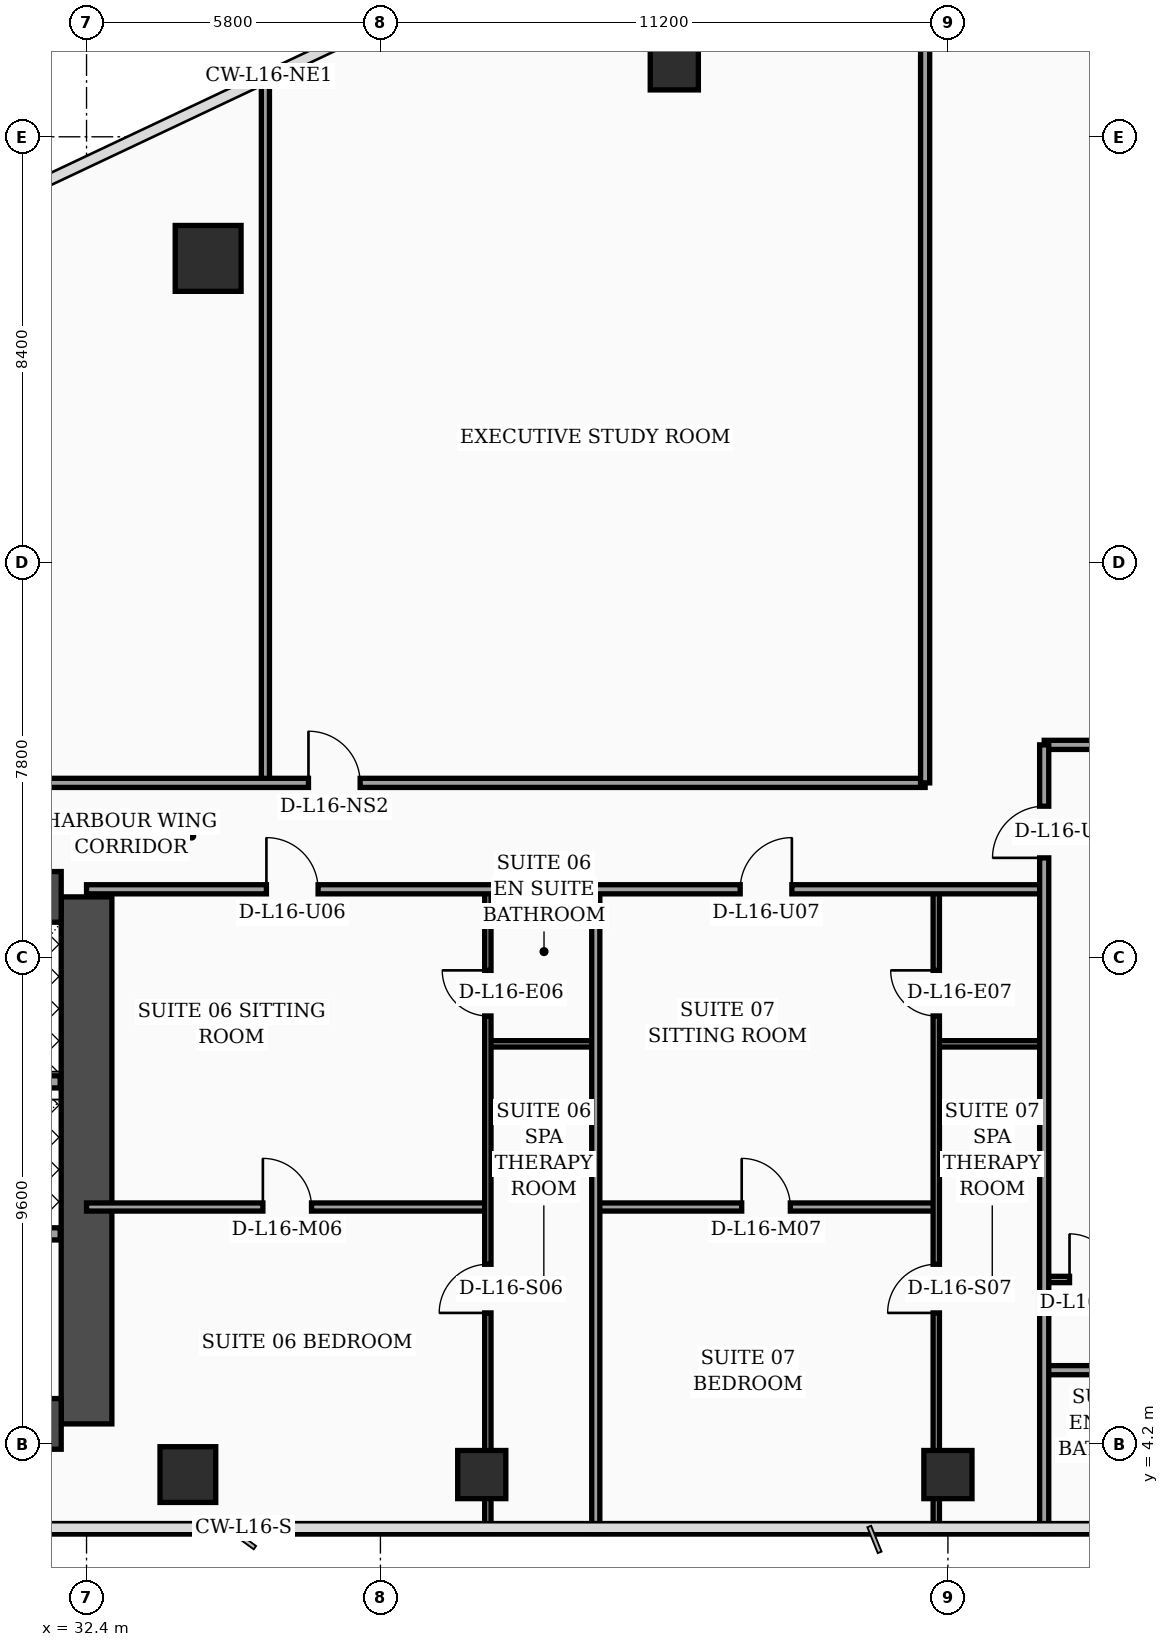
"""IFC4 building model, lengths in metres.
Left out: names, types, materials, properties, quantities, classifications, styles, units other than length and angle.
Written with IfcOpenShell. Run it as: python <this file> out.ifc"""

import sys

from ifc_helpers import new_model, si_unit, direction, frame, frame_2d, origin, origin_2d, place, context, subcontext, project, spatial, rectangle, hollow_rectangle, circle, extrude, element, fill, save


model = new_model("IFC4")
c1 = context("Model", 3, precision=1e-05, world=origin(), true_north=direction((0.0, 1.0)))
c2 = subcontext(c1, "Body", "Model", "MODEL_VIEW")
j1 = project(units=[si_unit("LENGTHUNIT", "METRE"), si_unit("PLANEANGLEUNIT", "RADIAN")], contexts=[c1])
p1 = place(None, origin())
s1 = spatial("IfcSite", under=j1, at=p1, CompositionType="ELEMENT")
p2 = place(p1, origin())
s2 = spatial("IfcBuilding", under=s1, at=p2, CompositionType="ELEMENT")
p3 = place(p2, frame((0.0, 0.0, 69.8)))
s3 = spatial("IfcBuildingStorey", under=s2, at=p3, CompositionType="ELEMENT", Elevation=69.8)
p4 = place(p3, frame((32.4, 4.6, 0.0), z_axis=(0.0, 0.0, 1.0), x_axis=(0.0, 1.0, 0.0)))
e1 = element("IfcWall", 1, at=p4, inside=s3, PredefinedType="SHEAR", context=c2, shape_type="SweptSolid", body=[
    extrude(rectangle(XDim=10.4, YDim=1.0, at=frame_2d((5.2, 0.0))), origin(), (0.0, 0.0, 1.0), 3.56),
])
p5 = place(p3, frame((22.1, 15.0, 0.0), z_axis=(0.0, 0.0, 1.0), x_axis=(1.0, 0.0, 0.0)))
e2 = element("IfcWall", 2, at=p5, inside=s3, PredefinedType="SHEAR", context=c2, shape_type="SweptSolid", body=[
    extrude(rectangle(XDim=9.8, YDim=1.0, at=frame_2d((4.9, 0.0))), origin(), (0.0, 0.0, 1.0), 3.56),
])
p6 = place(p5, frame((4.8, 0.0, 0.0)))
e3 = element("IfcOpeningElement", 3, at=p6, cuts=e2, PredefinedType="OPENING", context=c2, shape_type="SweptSolid", body=[
    extrude(rectangle(XDim=1.1, YDim=2.2, at=frame_2d((0.55, 1.1))), frame((0.0, 0.51, 0.0), z_axis=(0.0, -1.0, 0.0), x_axis=(1.0, 0.0, 0.0)), (0.0, 0.0, 1.0), 1.02),
])
p7 = place(p3, frame((22.1, 4.6, 0.0), z_axis=(0.0, 0.0, 1.0), x_axis=(1.0, 0.0, 0.0)))
e4 = element("IfcWall", 4, at=p7, inside=s3, PredefinedType="SHEAR", context=c2, shape_type="SweptSolid", body=[
    extrude(rectangle(XDim=9.8, YDim=1.0, at=frame_2d((4.9, 0.0))), origin(), (0.0, 0.0, 1.0), 3.56),
])
p8 = place(p3, frame((34.4, 3.6, 0.0), z_axis=(0.0, 0.0, 1.0), x_axis=(1.0, 0.0, 0.0)))
e5 = element("IfcColumn", 5, at=p8, inside=s3, PredefinedType="COLUMN", context=c2, shape_type="SweptSolid", body=[
    extrude(hollow_rectangle(XDim=1.1, YDim=1.1, WallThickness=0.045, at=origin_2d()), origin(), (0.0, 0.0, 1.0), 3.56),
])
for number, where, z_axis, x_axis in (
    (6, (40.2, 3.6, 0.0), (0.0, 0.0, 1.0), (1.0, 0.0, 0.0)),
    (7, (49.4, 3.6, 0.0), (0.0, 0.0, 1.0), (1.0, 0.0, 0.0)),
):
    element("IfcColumn", number, at=place(p3, frame(where, z_axis=z_axis, x_axis=x_axis)), inside=s3, PredefinedType="COLUMN", context=c2, shape_type="SweptSolid", body=[
        extrude(hollow_rectangle(XDim=0.95, YDim=0.95, WallThickness=0.04, at=origin_2d()), origin(), (0.0, 0.0, 1.0), 3.56),
    ])
p9 = place(p3, frame((34.8, 27.6, 0.0), z_axis=(0.0, 0.0, 1.0), x_axis=(1.0, 0.0, 0.0)))
e8 = element("IfcColumn", 8, at=p9, inside=s3, PredefinedType="COLUMN", context=c2, shape_type="SweptSolid", body=[
    extrude(circle(Radius=0.65, at=origin_2d()), origin(), (0.0, 0.0, 1.0), 3.56),
])
p10 = place(p3, frame((44.0, 31.4, 0.0), z_axis=(0.0, 0.0, 1.0), x_axis=(1.0, 0.0, 0.0)))
e9 = element("IfcColumn", 9, at=p10, inside=s3, PredefinedType="COLUMN", context=c2, shape_type="SweptSolid", body=[
    extrude(hollow_rectangle(XDim=0.95, YDim=0.95, WallThickness=0.04, at=origin_2d()), origin(), (0.0, 0.0, 1.0), 3.56),
])
p11 = place(p3, frame((27.02, 11.35, 0.0), z_axis=(0.0, 0.0, 1.0), x_axis=(1.0, 0.0, 0.0)))
e10 = element("IfcWall", 10, at=p11, inside=s3, PredefinedType="SOLIDWALL", context=c2, shape_type="SweptSolid", body=[
    extrude(rectangle(XDim=4.86, YDim=0.24, at=frame_2d((2.43, 0.0))), origin(), (0.0, 0.0, 1.0), 3.56),
])
p12 = place(p11, frame((0.45, 0.0, 0.0)))
e11 = element("IfcOpeningElement", 11, at=p12, cuts=e10, PredefinedType="OPENING", context=c2, shape_type="SweptSolid", body=[
    extrude(rectangle(XDim=1.3, YDim=2.35, at=frame_2d((0.65, 1.175))), frame((0.0, 0.13, 0.0), z_axis=(0.0, -1.0, 0.0), x_axis=(1.0, 0.0, 0.0)), (0.0, 0.0, 1.0), 0.26),
])
p13 = place(p3, frame((27.02, 8.35, 0.0), z_axis=(0.0, 0.0, 1.0), x_axis=(1.0, 0.0, 0.0)))
e12 = element("IfcWall", 12, at=p13, inside=s3, PredefinedType="SOLIDWALL", context=c2, shape_type="SweptSolid", body=[
    extrude(rectangle(XDim=4.86, YDim=0.24, at=frame_2d((2.43, 0.0))), origin(), (0.0, 0.0, 1.0), 3.09),
])
p14 = place(p3, frame((40.32, 12.1, 0.0), z_axis=(0.0, 0.0, 1.0), x_axis=(1.0, 0.0, 0.0)))
e13 = element("IfcWall", 13, at=p14, inside=s3, PredefinedType="PARTITIONING", context=c2, shape_type="SweptSolid", body=[
    extrude(rectangle(XDim=2.13, YDim=0.125, at=frame_2d((1.065, 0.0))), origin(), (0.0, 0.0, 1.0), 3.56),
])
p15 = place(p3, frame((32.4, 8.88, 0.0), z_axis=(0.0, 0.0, 1.0), x_axis=(1.0, 0.0, 0.0)))
e14 = element("IfcWall", 14, at=p15, inside=s3, PredefinedType="PARTITIONING", context=c2, shape_type="SweptSolid", body=[
    extrude(rectangle(XDim=7.92, YDim=0.16, at=frame_2d((3.96, 0.0))), origin(), (0.0, 0.0, 1.0), 2.84),
])
p16 = place(p15, frame((3.48, 0.0, 0.0)))
e15 = element("IfcOpeningElement", 15, at=p16, cuts=e14, PredefinedType="OPENING", context=c2, shape_type="SweptSolid", body=[
    extrude(rectangle(XDim=0.96, YDim=2.2, at=frame_2d((0.48, 1.1))), frame((0.0, 0.09, 0.0), z_axis=(0.0, -1.0, 0.0), x_axis=(1.0, 0.0, 0.0)), (0.0, 0.0, 1.0), 0.18),
])
p17 = place(p3, frame((40.32, 2.44, 0.0), z_axis=(0.0, 0.0, 1.0), x_axis=(0.0, 1.0, 0.0)))
e16 = element("IfcWall", 16, at=p17, inside=s3, PredefinedType="PARTITIONING", context=c2, shape_type="SweptSolid", body=[
    extrude(rectangle(XDim=12.71, YDim=0.125, at=frame_2d((6.355, 0.0))), origin(), (0.0, 0.0, 1.0), 2.84),
])
p18 = place(p17, frame((4.35, 0.0, 0.0)))
e17 = element("IfcOpeningElement", 17, at=p18, cuts=e16, PredefinedType="OPENING", context=c2, shape_type="SweptSolid", body=[
    extrude(rectangle(XDim=0.96, YDim=2.2, at=frame_2d((0.48, 1.1))), frame((0.0, 0.073, 0.0), z_axis=(0.0, -1.0, 0.0), x_axis=(1.0, 0.0, 0.0)), (0.0, 0.0, 1.0), 0.145),
])
p19 = place(p17, frame((10.21, 0.0, 0.0)))
e18 = element("IfcOpeningElement", 18, at=p19, cuts=e16, PredefinedType="OPENING", context=c2, shape_type="SweptSolid", body=[
    extrude(rectangle(XDim=0.9, YDim=2.15, at=frame_2d((0.45, 1.075))), frame((0.0, 0.073, 0.0), z_axis=(0.0, -1.0, 0.0), x_axis=(1.0, 0.0, 0.0)), (0.0, 0.0, 1.0), 0.145),
])
p20 = place(p3, frame((49.17, 12.1, 0.0), z_axis=(0.0, 0.0, 1.0), x_axis=(1.0, 0.0, 0.0)))
e19 = element("IfcWall", 19, at=p20, inside=s3, PredefinedType="PARTITIONING", context=c2, shape_type="SweptSolid", body=[
    extrude(rectangle(XDim=2.13, YDim=0.125, at=frame_2d((1.065, 0.0))), origin(), (0.0, 0.0, 1.0), 3.56),
])
p21 = place(p3, frame((42.45, 8.88, 0.0), z_axis=(0.0, 0.0, 1.0), x_axis=(1.0, 0.0, 0.0)))
e20 = element("IfcWall", 20, at=p21, inside=s3, PredefinedType="PARTITIONING", context=c2, shape_type="SweptSolid", body=[
    extrude(rectangle(XDim=6.72, YDim=0.16, at=frame_2d((3.36, 0.0))), origin(), (0.0, 0.0, 1.0), 2.84),
])
p22 = place(p21, frame((2.88, 0.0, 0.0)))
e21 = element("IfcOpeningElement", 21, at=p22, cuts=e20, PredefinedType="OPENING", context=c2, shape_type="SweptSolid", body=[
    extrude(rectangle(XDim=0.96, YDim=2.2, at=frame_2d((0.48, 1.1))), frame((0.0, 0.09, 0.0), z_axis=(0.0, -1.0, 0.0), x_axis=(1.0, 0.0, 0.0)), (0.0, 0.0, 1.0), 0.18),
])
p23 = place(p3, frame((49.17, 2.44, 0.0), z_axis=(0.0, 0.0, 1.0), x_axis=(0.0, 1.0, 0.0)))
e22 = element("IfcWall", 22, at=p23, inside=s3, PredefinedType="PARTITIONING", context=c2, shape_type="SweptSolid", body=[
    extrude(rectangle(XDim=12.71, YDim=0.125, at=frame_2d((6.355, 0.0))), origin(), (0.0, 0.0, 1.0), 2.84),
])
p24 = place(p23, frame((4.35, 0.0, 0.0)))
e23 = element("IfcOpeningElement", 23, at=p24, cuts=e22, PredefinedType="OPENING", context=c2, shape_type="SweptSolid", body=[
    extrude(rectangle(XDim=0.96, YDim=2.2, at=frame_2d((0.48, 1.1))), frame((0.0, 0.073, 0.0), z_axis=(0.0, -1.0, 0.0), x_axis=(1.0, 0.0, 0.0)), (0.0, 0.0, 1.0), 0.145),
])
p25 = place(p23, frame((10.21, 0.0, 0.0)))
e24 = element("IfcOpeningElement", 24, at=p25, cuts=e22, PredefinedType="OPENING", context=c2, shape_type="SweptSolid", body=[
    extrude(rectangle(XDim=0.9, YDim=2.15, at=frame_2d((0.45, 1.075))), frame((0.0, 0.073, 0.0), z_axis=(0.0, -1.0, 0.0), x_axis=(1.0, 0.0, 0.0)), (0.0, 0.0, 1.0), 0.145),
])
p26 = place(p3, frame((42.45, 2.44, 0.0), z_axis=(0.0, 0.0, 1.0), x_axis=(0.0, 1.0, 0.0)))
e25 = element("IfcWall", 25, at=p26, inside=s3, PredefinedType="PARTITIONING", context=c2, shape_type="SweptSolid", body=[
    extrude(rectangle(XDim=12.71, YDim=0.16, at=frame_2d((6.355, 0.0))), origin(), (0.0, 0.0, 1.0), 3.04),
])
p27 = place(p3, frame((32.4, 15.15, 0.0), z_axis=(0.0, 0.0, 1.0), x_axis=(1.0, 0.0, 0.0)))
e26 = element("IfcWall", 26, at=p27, inside=s3, PredefinedType="PARTITIONING", context=c2, shape_type="SweptSolid", body=[
    extrude(rectangle(XDim=18.9, YDim=0.18, at=frame_2d((9.45, 0.0))), origin(), (0.0, 0.0, 1.0), 2.84),
])
p28 = place(p27, frame((3.55, 0.0, 0.0)))
e27 = element("IfcOpeningElement", 27, at=p28, cuts=e26, PredefinedType="OPENING", context=c2, shape_type="SweptSolid", body=[
    extrude(rectangle(XDim=1.02, YDim=2.2, at=frame_2d((0.51, 1.1))), frame((0.0, 0.1, 0.0), z_axis=(0.0, -1.0, 0.0), x_axis=(1.0, 0.0, 0.0)), (0.0, 0.0, 1.0), 0.2),
])
p29 = place(p27, frame((12.9, 0.0, 0.0)))
e28 = element("IfcOpeningElement", 28, at=p29, cuts=e26, PredefinedType="OPENING", context=c2, shape_type="SweptSolid", body=[
    extrude(rectangle(XDim=1.02, YDim=2.2, at=frame_2d((0.51, 1.1))), frame((0.0, 0.1, 0.0), z_axis=(0.0, -1.0, 0.0), x_axis=(1.0, 0.0, 0.0)), (0.0, 0.0, 1.0), 0.2),
])
p30 = place(p3, frame((35.93, 17.25, 0.0), z_axis=(0.0, 0.0, 1.0), x_axis=(0.0, 1.0, 0.0)))
e29 = element("IfcWall", 29, at=p30, inside=s3, PredefinedType="PARTITIONING", context=c2, shape_type="SweptSolid", body=[
    extrude(rectangle(XDim=14.0, YDim=0.16, at=frame_2d((7.0, 0.0))), origin(), (0.0, 0.0, 1.0), 2.84),
])
p31 = place(p3, frame((21.5, 17.25, 0.0), z_axis=(0.0, 0.0, 1.0), x_axis=(1.0, 0.0, 0.0)))
e30 = element("IfcWall", 30, at=p31, inside=s3, PredefinedType="PARTITIONING", context=c2, shape_type="SweptSolid", body=[
    extrude(rectangle(XDim=27.45, YDim=0.18, at=frame_2d((13.725, 0.0))), origin(), (0.0, 0.0, 1.0), 2.84),
])
p32 = place(p31, frame((0.95, 0.0, 0.0)))
e31 = element("IfcOpeningElement", 31, at=p32, cuts=e30, PredefinedType="OPENING", context=c2, shape_type="SweptSolid", body=[
    extrude(rectangle(XDim=1.02, YDim=2.2, at=frame_2d((0.51, 1.1))), frame((0.0, 0.1, 0.0), z_axis=(0.0, -1.0, 0.0), x_axis=(1.0, 0.0, 0.0)), (0.0, 0.0, 1.0), 0.2),
])
p33 = place(p31, frame((15.28, 0.0, 0.0)))
e32 = element("IfcOpeningElement", 32, at=p33, cuts=e30, PredefinedType="OPENING", context=c2, shape_type="SweptSolid", body=[
    extrude(rectangle(XDim=1.02, YDim=2.2, at=frame_2d((0.51, 1.1))), frame((0.0, 0.1, 0.0), z_axis=(0.0, -1.0, 0.0), x_axis=(1.0, 0.0, 0.0)), (0.0, 0.0, 1.0), 0.2),
])
p34 = place(p3, frame((48.95, 17.25, 0.0), z_axis=(0.0, 0.0, 1.0), x_axis=(0.0, 1.0, 0.0)))
e33 = element("IfcWall", 33, at=p34, inside=s3, PredefinedType="PARTITIONING", context=c2, shape_type="SweptSolid", body=[
    extrude(rectangle(XDim=20.15, YDim=0.18, at=frame_2d((10.075, 0.0))), origin(), (0.0, 0.0, 1.0), 2.84),
])
p35 = place(p3, frame((51.3, 7.45, 0.0), z_axis=(0.0, 0.0, 1.0), x_axis=(1.0, 0.0, 0.0)))
e34 = element("IfcWall", 34, at=p35, inside=s3, PredefinedType="PARTITIONING", context=c2, shape_type="SweptSolid", body=[
    extrude(rectangle(XDim=11.66, YDim=0.125, at=frame_2d((5.83, 0.0))), origin(), (0.0, 0.0, 1.0), 3.04),
])
p36 = place(p35, frame((0.5, 0.0, 0.0)))
e35 = element("IfcOpeningElement", 35, at=p36, cuts=e34, PredefinedType="OPENING", context=c2, shape_type="SweptSolid", body=[
    extrude(rectangle(XDim=0.9, YDim=2.15, at=frame_2d((0.45, 1.075))), frame((0.0, 0.073, 0.0), z_axis=(0.0, -1.0, 0.0), x_axis=(1.0, 0.0, 0.0)), (0.0, 0.0, 1.0), 0.145),
])
p37 = place(p35, frame((3.6, 0.0, 0.0)))
e36 = element("IfcOpeningElement", 36, at=p37, cuts=e34, PredefinedType="OPENING", context=c2, shape_type="SweptSolid", body=[
    extrude(rectangle(XDim=0.96, YDim=2.2, at=frame_2d((0.48, 1.1))), frame((0.0, 0.073, 0.0), z_axis=(0.0, -1.0, 0.0), x_axis=(1.0, 0.0, 0.0)), (0.0, 0.0, 1.0), 0.145),
])
p38 = place(p3, frame((51.3, 5.66, 0.0), z_axis=(0.0, 0.0, 1.0), x_axis=(1.0, 0.0, 0.0)))
e37 = element("IfcWall", 37, at=p38, inside=s3, PredefinedType="PARTITIONING", context=c2, shape_type="SweptSolid", body=[
    extrude(rectangle(XDim=9.1, YDim=0.18, at=frame_2d((4.55, 0.0))), origin(), (0.0, 0.0, 1.0), 3.04),
])
p39 = place(p3, frame((51.3, 18.0, 0.0), z_axis=(0.0, 0.0, 1.0), x_axis=(1.0, 0.0, 0.0)))
e38 = element("IfcWall", 38, at=p39, inside=s3, PredefinedType="PARTITIONING", context=c2, shape_type="SweptSolid", body=[
    extrude(rectangle(XDim=8.33, YDim=0.18, at=frame_2d((4.165, 0.0))), origin(), (0.0, 0.0, 1.0), 3.04),
])
p40 = place(p3, frame((51.3, 2.44, 0.0), z_axis=(0.0, 0.0, 1.0), x_axis=(0.0, 1.0, 0.0)))
e39 = element("IfcWall", 39, at=p40, inside=s3, PredefinedType="PARTITIONING", context=c2, shape_type="SweptSolid", body=[
    extrude(rectangle(XDim=15.56, YDim=0.18, at=frame_2d((7.78, 0.0))), origin(), (0.0, 0.0, 1.0), 3.04),
])
p41 = place(p40, frame((13.33, 0.0, 0.0)))
e40 = element("IfcOpeningElement", 40, at=p41, cuts=e39, PredefinedType="OPENING", context=c2, shape_type="SweptSolid", body=[
    extrude(rectangle(XDim=1.02, YDim=2.2, at=frame_2d((0.51, 1.1))), frame((0.0, 0.1, 0.0), z_axis=(0.0, -1.0, 0.0), x_axis=(1.0, 0.0, 0.0)), (0.0, 0.0, 1.0), 0.2),
])
p42 = place(p16, origin())
e41 = element("IfcDoor", 41, at=p42, inside=s3, OperationType="SINGLE_SWING_LEFT", PredefinedType="DOOR", context=c2, shape_type="SweptSolid", body=[
    extrude(rectangle(XDim=0.96, YDim=2.2, at=frame_2d((0.48, 1.1))), frame((0.0, 0.025, 0.0), z_axis=(0.0, -1.0, 0.0), x_axis=(1.0, 0.0, 0.0)), (0.0, 0.0, 1.0), 0.05),
])
fill(e15, e41)
p43 = place(p18, origin())
e42 = element("IfcDoor", 42, at=p43, inside=s3, OperationType="SINGLE_SWING_LEFT", PredefinedType="DOOR", context=c2, shape_type="SweptSolid", body=[
    extrude(rectangle(XDim=0.96, YDim=2.2, at=frame_2d((0.48, 1.1))), frame((0.0, 0.025, 0.0), z_axis=(0.0, -1.0, 0.0), x_axis=(1.0, 0.0, 0.0)), (0.0, 0.0, 1.0), 0.05),
])
fill(e17, e42)
p44 = place(p19, origin())
e43 = element("IfcDoor", 43, at=p44, inside=s3, OperationType="SINGLE_SWING_RIGHT", PredefinedType="DOOR", context=c2, shape_type="SweptSolid", body=[
    extrude(rectangle(XDim=0.9, YDim=2.15, at=frame_2d((0.45, 1.075))), frame((0.0, 0.025, 0.0), z_axis=(0.0, -1.0, 0.0), x_axis=(1.0, 0.0, 0.0)), (0.0, 0.0, 1.0), 0.05),
])
fill(e18, e43)
p45 = place(p22, origin())
e44 = element("IfcDoor", 44, at=p45, inside=s3, OperationType="SINGLE_SWING_LEFT", PredefinedType="DOOR", context=c2, shape_type="SweptSolid", body=[
    extrude(rectangle(XDim=0.96, YDim=2.2, at=frame_2d((0.48, 1.1))), frame((0.0, 0.025, 0.0), z_axis=(0.0, -1.0, 0.0), x_axis=(1.0, 0.0, 0.0)), (0.0, 0.0, 1.0), 0.05),
])
fill(e21, e44)
p46 = place(p24, origin())
e45 = element("IfcDoor", 45, at=p46, inside=s3, OperationType="SINGLE_SWING_LEFT", PredefinedType="DOOR", context=c2, shape_type="SweptSolid", body=[
    extrude(rectangle(XDim=0.96, YDim=2.2, at=frame_2d((0.48, 1.1))), frame((0.0, 0.025, 0.0), z_axis=(0.0, -1.0, 0.0), x_axis=(1.0, 0.0, 0.0)), (0.0, 0.0, 1.0), 0.05),
])
fill(e23, e45)
p47 = place(p25, origin())
e46 = element("IfcDoor", 46, at=p47, inside=s3, OperationType="SINGLE_SWING_RIGHT", PredefinedType="DOOR", context=c2, shape_type="SweptSolid", body=[
    extrude(rectangle(XDim=0.9, YDim=2.15, at=frame_2d((0.45, 1.075))), frame((0.0, 0.025, 0.0), z_axis=(0.0, -1.0, 0.0), x_axis=(1.0, 0.0, 0.0)), (0.0, 0.0, 1.0), 0.05),
])
fill(e24, e46)
p48 = place(p28, origin())
e47 = element("IfcDoor", 47, at=p48, inside=s3, OperationType="SINGLE_SWING_LEFT", PredefinedType="DOOR", context=c2, shape_type="SweptSolid", body=[
    extrude(rectangle(XDim=1.02, YDim=2.2, at=frame_2d((0.51, 1.1))), frame((0.0, 0.025, 0.0), z_axis=(0.0, -1.0, 0.0), x_axis=(1.0, 0.0, 0.0)), (0.0, 0.0, 1.0), 0.05),
])
fill(e27, e47)
p49 = place(p29, origin())
e48 = element("IfcDoor", 48, at=p49, inside=s3, OperationType="SINGLE_SWING_RIGHT", PredefinedType="DOOR", context=c2, shape_type="SweptSolid", body=[
    extrude(rectangle(XDim=1.02, YDim=2.2, at=frame_2d((0.51, 1.1))), frame((0.0, 0.025, 0.0), z_axis=(0.0, -1.0, 0.0), x_axis=(1.0, 0.0, 0.0)), (0.0, 0.0, 1.0), 0.05),
])
fill(e28, e48)
p50 = place(p33, origin())
e49 = element("IfcDoor", 49, at=p50, inside=s3, OperationType="SINGLE_SWING_LEFT", PredefinedType="DOOR", context=c2, shape_type="SweptSolid", body=[
    extrude(rectangle(XDim=1.02, YDim=2.2, at=frame_2d((0.51, 1.1))), frame((0.0, 0.025, 0.0), z_axis=(0.0, -1.0, 0.0), x_axis=(1.0, 0.0, 0.0)), (0.0, 0.0, 1.0), 0.05),
])
fill(e32, e49)
p51 = place(p36, origin())
e50 = element("IfcDoor", 50, at=p51, inside=s3, OperationType="SINGLE_SWING_LEFT", PredefinedType="DOOR", context=c2, shape_type="SweptSolid", body=[
    extrude(rectangle(XDim=0.9, YDim=2.15, at=frame_2d((0.45, 1.075))), frame((0.0, 0.025, 0.0), z_axis=(0.0, -1.0, 0.0), x_axis=(1.0, 0.0, 0.0)), (0.0, 0.0, 1.0), 0.05),
])
fill(e35, e50)
p52 = place(p41, origin())
e51 = element("IfcDoor", 51, at=p52, inside=s3, OperationType="SINGLE_SWING_LEFT", PredefinedType="DOOR", context=c2, shape_type="SweptSolid", body=[
    extrude(rectangle(XDim=1.02, YDim=2.2, at=frame_2d((0.51, 1.1))), frame((0.0, 0.025, 0.0), z_axis=(0.0, -1.0, 0.0), x_axis=(1.0, 0.0, 0.0)), (0.0, 0.0, 1.0), 0.05),
])
fill(e40, e51)
save(model, sys.argv[1])
